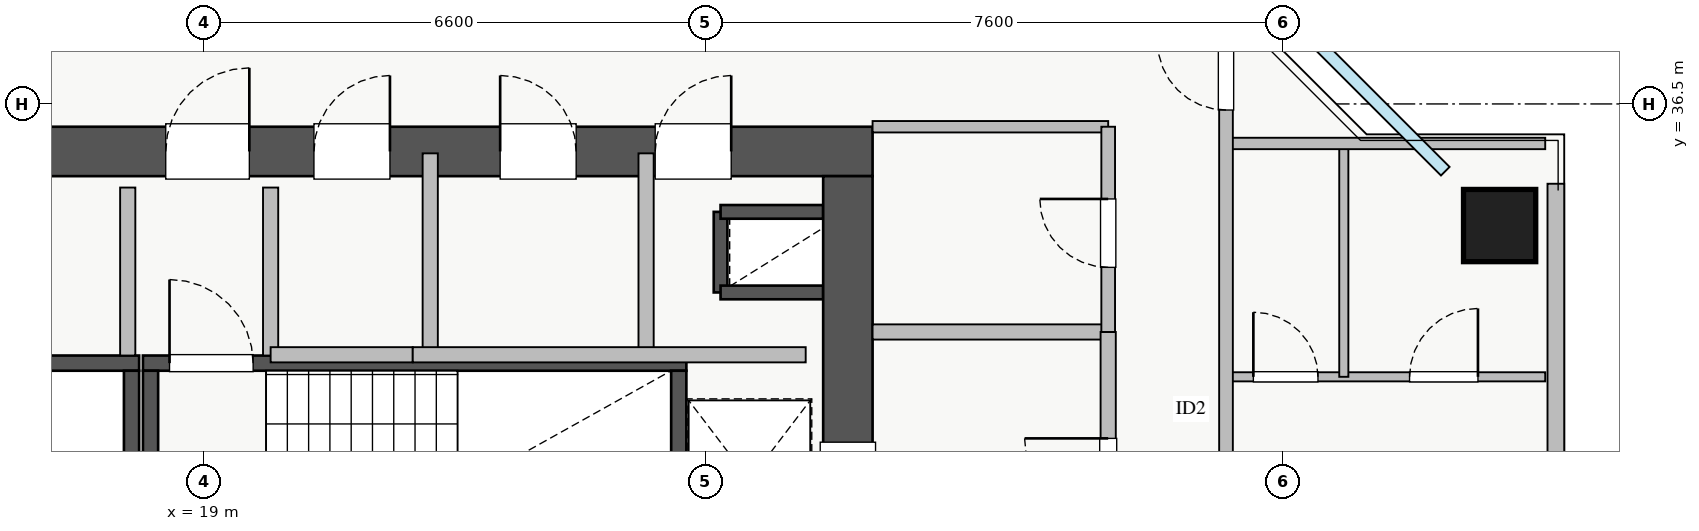
"""IFC4 building model, lengths in metres.
Left out: names, types, materials, properties, quantities, classifications, styles, units other than length and angle.
Written with IfcOpenShell. Run it as: python <this file> out.ifc"""

import sys

from ifc_helpers import new_model, si_unit, direction, frame, frame_2d, origin, origin_2d, place, context, subcontext, project, spatial, rectangle, extrude, source, transform, mapped, element, fill, save


model = new_model("IFC4")
c1 = context("Model", 3, precision=1e-05, world=origin(), true_north=direction((0.0, 1.0)))
c2 = subcontext(c1, "Body", "Model", "MODEL_VIEW")
j1 = project(units=[si_unit("LENGTHUNIT", "METRE"), si_unit("PLANEANGLEUNIT", "RADIAN")], contexts=[c1])
p1 = place(None, origin())
s1 = spatial("IfcSite", under=j1, at=p1, CompositionType="ELEMENT")
p2 = place(p1, origin())
s2 = spatial("IfcBuilding", under=s1, at=p2, CompositionType="ELEMENT")
p3 = place(p2, frame((0.0, 0.0, 160.0)))
s3 = spatial("IfcBuildingStorey", under=s2, at=p3, CompositionType="ELEMENT", Elevation=160.0)
p4 = place(p3, frame((25.8, 34.02, 0.0), z_axis=(0.0, 0.0, 1.0), x_axis=(0.0, 1.0, 0.0)))
e1 = element("IfcWall", 1, at=p4, inside=s3, PredefinedType="SHEAR", context=c2, shape_type="SweptSolid", body=[
    extrude(rectangle(XDim=1.06, YDim=0.18, at=frame_2d((0.53, 0.0))), origin(), (0.0, 0.0, 1.0), 3.07),
])
for number, where, z_axis, x_axis in (
    (2, (25.8, 35.08, 0.0), (0.0, 0.0, 1.0), (1.0, 0.0, 0.0)),
    (3, (25.8, 34.02, 0.0), (0.0, 0.0, 1.0), (1.0, 0.0, 0.0)),
):
    element("IfcWall", number, at=place(p3, frame(where, z_axis=z_axis, x_axis=x_axis)), inside=s3, PredefinedType="SHEAR", context=c2, shape_type="SweptSolid", body=[
        extrude(rectangle(XDim=1.35, YDim=0.18, at=frame_2d((0.675, 0.0))), origin(), (0.0, 0.0, 1.0), 3.07),
    ])
p5 = place(p3, frame((10.85, 33.09, 0.0), z_axis=(0.0, 0.0, 1.0), x_axis=(1.0, 0.0, 0.0)))
e4 = element("IfcWall", 4, at=p5, inside=s3, PredefinedType="SHEAR", context=c2, shape_type="SweptSolid", body=[
    extrude(rectangle(XDim=7.3, YDim=0.2, at=frame_2d((3.65, 0.0))), origin(), (0.0, 0.0, 1.0), 3.25),
])
p6 = place(p5, frame((0.35, 0.0, 0.0)))
e5 = element("IfcOpeningElement", 5, at=p6, cuts=e4, PredefinedType="OPENING", context=c2, shape_type="SweptSolid", body=[
    extrude(rectangle(XDim=1.1, YDim=2.05, at=frame_2d((0.55, 1.025))), frame((0.0, 0.11, 0.0), z_axis=(0.0, -1.0, 0.0), x_axis=(1.0, 0.0, 0.0)), (0.0, 0.0, 1.0), 0.22),
])
p7 = place(p3, frame((18.05, 30.05, 0.0), z_axis=(0.0, 0.0, 1.0), x_axis=(0.0, 1.0, 0.0)))
e6 = element("IfcWall", 6, at=p7, inside=s3, PredefinedType="SHEAR", context=c2, shape_type="SweptSolid", body=[
    extrude(rectangle(XDim=2.94, YDim=0.2, at=frame_2d((1.47, 0.0))), origin(), (0.0, 0.0, 1.0), 3.25),
])
p8 = place(p3, frame((18.2, 33.09, 0.0), z_axis=(0.0, 0.0, 1.0), x_axis=(1.0, 0.0, 0.0)))
e7 = element("IfcWall", 7, at=p8, inside=s3, PredefinedType="SHEAR", context=c2, shape_type="SweptSolid", body=[
    extrude(rectangle(XDim=7.15, YDim=0.2, at=frame_2d((3.575, 0.0))), origin(), (0.0, 0.0, 1.0), 3.25),
])
p9 = place(p8, frame((0.35, 0.0, 0.0)))
e8 = element("IfcOpeningElement", 8, at=p9, cuts=e7, PredefinedType="OPENING", context=c2, shape_type="SweptSolid", body=[
    extrude(rectangle(XDim=1.1, YDim=2.05, at=frame_2d((0.55, 1.025))), frame((0.0, 0.11, 0.0), z_axis=(0.0, -1.0, 0.0), x_axis=(1.0, 0.0, 0.0)), (0.0, 0.0, 1.0), 0.22),
])
for number, where, z_axis, x_axis in (
    (9, (18.3, 30.05, 0.0), (0.0, 0.0, 1.0), (0.0, 1.0, 0.0)),
    (10, (25.25, 30.05, 0.0), (0.0, 0.0, 1.0), (0.0, 1.0, 0.0)),
):
    element("IfcWall", number, at=place(p3, frame(where, z_axis=z_axis, x_axis=x_axis)), inside=s3, PredefinedType="SHEAR", context=c2, shape_type="SweptSolid", body=[
        extrude(rectangle(XDim=2.94, YDim=0.2, at=frame_2d((1.47, 0.0))), origin(), (0.0, 0.0, 1.0), 3.25),
    ])
p10 = place(p3, frame((10.2, 35.875, 0.0), z_axis=(0.0, 0.0, 1.0), x_axis=(1.0, 0.0, 0.0)))
e11 = element("IfcWall", 11, at=p10, inside=s3, PredefinedType="SHEAR", context=c2, shape_type="SweptSolid", body=[
    extrude(rectangle(XDim=17.6, YDim=0.65, at=frame_2d((8.8, 0.0))), origin(), (0.0, 0.0, 1.0), 3.25),
])
p11 = place(p10, frame((1.15, 0.0, 0.0)))
e12 = element("IfcOpeningElement", 12, at=p11, cuts=e11, PredefinedType="OPENING", context=c2, shape_type="SweptSolid", body=[
    extrude(rectangle(XDim=1.1, YDim=2.05, at=frame_2d((0.55, 1.025))), frame((0.0, 0.335, 0.0), z_axis=(0.0, -1.0, 0.0), x_axis=(1.0, 0.0, 0.0)), (0.0, 0.0, 1.0), 0.67),
])
p12 = place(p10, frame((8.3, 0.0, 0.0)))
e13 = element("IfcOpeningElement", 13, at=p12, cuts=e11, PredefinedType="OPENING", context=c2, shape_type="SweptSolid", body=[
    extrude(rectangle(XDim=1.1, YDim=2.05, at=frame_2d((0.55, 1.025))), frame((0.0, 0.335, 0.0), z_axis=(0.0, -1.0, 0.0), x_axis=(1.0, 0.0, 0.0)), (0.0, 0.0, 1.0), 0.67),
])
p13 = place(p10, frame((4.9, 0.0, 0.0)))
e14 = element("IfcOpeningElement", 14, at=p13, cuts=e11, PredefinedType="OPENING", context=c2, shape_type="SweptSolid", body=[
    extrude(rectangle(XDim=1.1, YDim=2.05, at=frame_2d((0.55, 1.025))), frame((0.0, 0.335, 0.0), z_axis=(0.0, -1.0, 0.0), x_axis=(1.0, 0.0, 0.0)), (0.0, 0.0, 1.0), 0.67),
])
p14 = place(p10, frame((14.74, 0.0, 0.0)))
e15 = element("IfcOpeningElement", 15, at=p14, cuts=e11, PredefinedType="OPENING", context=c2, shape_type="SweptSolid", body=[
    extrude(rectangle(XDim=1.0, YDim=2.05, at=frame_2d((0.5, 1.025))), frame((0.0, 0.335, 0.0), z_axis=(0.0, -1.0, 0.0), x_axis=(1.0, 0.0, 0.0)), (0.0, 0.0, 1.0), 0.67),
])
p15 = place(p10, frame((10.25, 0.0, 0.0)))
e16 = element("IfcOpeningElement", 16, at=p15, cuts=e11, PredefinedType="OPENING", context=c2, shape_type="SweptSolid", body=[
    extrude(rectangle(XDim=1.0, YDim=2.05, at=frame_2d((0.5, 1.025))), frame((0.0, 0.335, 0.0), z_axis=(0.0, -1.0, 0.0), x_axis=(1.0, 0.0, 0.0)), (0.0, 0.0, 1.0), 0.67),
])
p16 = place(p10, frame((12.7, 0.0, 0.0)))
e17 = element("IfcOpeningElement", 17, at=p16, cuts=e11, PredefinedType="OPENING", context=c2, shape_type="SweptSolid", body=[
    extrude(rectangle(XDim=1.0, YDim=2.05, at=frame_2d((0.5, 1.025))), frame((0.0, 0.335, 0.0), z_axis=(0.0, -1.0, 0.0), x_axis=(1.0, 0.0, 0.0)), (0.0, 0.0, 1.0), 0.67),
])
p17 = place(p3, frame((27.475, 29.65, 0.0), z_axis=(0.0, 0.0, 1.0), x_axis=(0.0, 1.0, 0.0)))
e18 = element("IfcWall", 18, at=p17, inside=s3, PredefinedType="SHEAR", context=c2, shape_type="SweptSolid", body=[
    extrude(rectangle(XDim=5.9, YDim=0.65, at=frame_2d((2.95, 0.0))), origin(), (0.0, 0.0, 1.0), 3.25),
])
p18 = place(p17, frame((1.1, 0.0, 0.0)))
e19 = element("IfcOpeningElement", 19, at=p18, cuts=e18, PredefinedType="OPENING", context=c2, shape_type="SweptSolid", body=[
    extrude(rectangle(XDim=1.3, YDim=2.05, at=frame_2d((0.65, 1.025))), frame((0.0, 0.335, 0.0), z_axis=(0.0, -1.0, 0.0), x_axis=(1.0, 0.0, 0.0)), (0.0, 0.0, 1.0), 0.67),
])
m1 = source(origin(), c2, "Body", "SweptSolid", [
    extrude(rectangle(XDim=0.95, YDim=0.95, at=origin_2d()), origin(), (0.0, 0.0, 1.0), 3.25),
])
p19 = place(p3, frame((36.05, 34.9, 0.0), z_axis=(0.0, 0.0, 1.0), x_axis=(1.0, 0.0, 0.0)))
e20 = element("IfcColumn", 20, at=p19, inside=s3, PredefinedType="COLUMN", context=c2, shape_type="MappedRepresentation", body=[
    mapped(m1, transform((0.0, 0.0, 0.0), x_axis=(1.0, 0.0, 0.0), y_axis=(0.0, 1.0, 0.0), z_axis=(0.0, 0.0, 1.0), scale=1.0)),
])
p20 = place(p3, frame((36.79, 29.15, 0.0), z_axis=(0.0, 0.0, 1.0), x_axis=(0.0, 1.0, 0.0)))
e21 = element("IfcWall", 21, at=p20, inside=s3, PredefinedType="STANDARD", context=c2, shape_type="SweptSolid", body=[
    extrude(rectangle(XDim=6.3, YDim=0.22, at=frame_2d((3.15, 0.0))), origin(), (0.0, 0.0, 1.0), 2.61),
])
p21 = place(p3, frame((27.8, 33.5, 0.0), z_axis=(0.0, 0.0, 1.0), x_axis=(1.0, 0.0, 0.0)))
e22 = element("IfcWall", 22, at=p21, inside=s3, PredefinedType="PARTITIONING", context=c2, shape_type="SweptSolid", body=[
    extrude(rectangle(XDim=3.1, YDim=0.2, at=frame_2d((1.55, 0.0))), origin(), (0.0, 0.0, 1.0), 3.07),
])
p22 = place(p3, frame((30.9, 29.6, 0.0), z_axis=(0.0, 0.0, 1.0), x_axis=(0.0, 1.0, 0.0)))
e23 = element("IfcWall", 23, at=p22, inside=s3, PredefinedType="PARTITIONING", context=c2, shape_type="SweptSolid", body=[
    extrude(rectangle(XDim=3.9, YDim=0.2, at=frame_2d((1.95, 0.0))), origin(), (0.0, 0.0, 1.0), 3.07),
])
p23 = place(p22, frame((1.4, 0.0, 0.0)))
e24 = element("IfcOpeningElement", 24, at=p23, cuts=e23, PredefinedType="OPENING", context=c2, shape_type="SweptSolid", body=[
    extrude(rectangle(XDim=1.1, YDim=2.05, at=frame_2d((0.55, 1.025))), frame((0.0, 0.11, 0.0), z_axis=(0.0, -1.0, 0.0), x_axis=(1.0, 0.0, 0.0)), (0.0, 0.0, 1.0), 0.22),
])
for number, where, z_axis, x_axis in (
    (25, (18.0, 33.19, 0.0), (0.0, 0.0, 1.0), (0.0, 1.0, 0.0)),
    (26, (19.88, 33.19, 0.0), (0.0, 0.0, 1.0), (0.0, 1.0, 0.0)),
):
    element("IfcWall", number, at=place(p3, frame(where, z_axis=z_axis, x_axis=x_axis)), inside=s3, PredefinedType="PARTITIONING", context=c2, shape_type="SweptSolid", body=[
        extrude(rectangle(XDim=2.21, YDim=0.2, at=frame_2d((1.105, 0.0))), origin(), (0.0, 0.0, 1.0), 3.07),
    ])
p24 = place(p3, frame((24.82, 33.2, 0.0), z_axis=(0.0, 0.0, 1.0), x_axis=(0.0, 1.0, 0.0)))
e27 = element("IfcWall", 27, at=p24, inside=s3, PredefinedType="PARTITIONING", context=c2, shape_type="SweptSolid", body=[
    extrude(rectangle(XDim=2.65, YDim=0.2, at=frame_2d((1.325, 0.0))), origin(), (0.0, 0.0, 1.0), 3.07),
])
p25 = place(p3, frame((19.88, 33.2, 0.0), z_axis=(0.0, 0.0, 1.0), x_axis=(1.0, 0.0, 0.0)))
e28 = element("IfcWall", 28, at=p25, inside=s3, PredefinedType="PARTITIONING", context=c2, shape_type="SweptSolid", body=[
    extrude(rectangle(XDim=1.87, YDim=0.2, at=frame_2d((0.935, 0.0))), origin(), (0.0, 0.0, 1.0), 3.07),
])
p26 = place(p3, frame((21.98, 33.2, 0.0), z_axis=(0.0, 0.0, 1.0), x_axis=(0.0, 1.0, 0.0)))
e29 = element("IfcWall", 29, at=p26, inside=s3, PredefinedType="PARTITIONING", context=c2, shape_type="SweptSolid", body=[
    extrude(rectangle(XDim=2.65, YDim=0.2, at=frame_2d((1.325, 0.0))), origin(), (0.0, 0.0, 1.0), 3.07),
])
p27 = place(p3, frame((21.75, 33.2, 0.0), z_axis=(0.0, 0.0, 1.0), x_axis=(1.0, 0.0, 0.0)))
e30 = element("IfcWall", 30, at=p27, inside=s3, PredefinedType="PARTITIONING", context=c2, shape_type="SweptSolid", body=[
    extrude(rectangle(XDim=5.17, YDim=0.2, at=frame_2d((2.585, 0.0))), origin(), (0.0, 0.0, 1.0), 3.07),
])
p28 = place(p3, frame((27.8, 36.2, 0.0), z_axis=(0.0, 0.0, 1.0), x_axis=(1.0, 0.0, 0.0)))
e31 = element("IfcWall", 31, at=p28, inside=s3, PredefinedType="PARTITIONING", context=c2, shape_type="SweptSolid", body=[
    extrude(rectangle(XDim=3.1, YDim=0.15, at=frame_2d((1.55, 0.0))), origin(), (0.0, 0.0, 1.0), 3.07),
])
p29 = place(p3, frame((30.9, 33.5, 0.0), z_axis=(0.0, 0.0, 1.0), x_axis=(0.0, 1.0, 0.0)))
e32 = element("IfcWall", 32, at=p29, inside=s3, PredefinedType="PARTITIONING", context=c2, shape_type="SweptSolid", body=[
    extrude(rectangle(XDim=2.7, YDim=0.18, at=frame_2d((1.35, 0.0))), origin(), (0.0, 0.0, 1.0), 2.565),
])
p30 = place(p29, frame((0.85, 0.0, 0.0)))
e33 = element("IfcOpeningElement", 33, at=p30, cuts=e32, PredefinedType="OPENING", context=c2, shape_type="SweptSolid", body=[
    extrude(rectangle(XDim=0.9, YDim=2.05, at=frame_2d((0.45, 1.025))), frame((0.0, 0.1, 0.0), z_axis=(0.0, -1.0, 0.0), x_axis=(1.0, 0.0, 0.0)), (0.0, 0.0, 1.0), 0.2),
])
p31 = place(p3, frame((32.45, 32.91, 0.0), z_axis=(0.0, 0.0, 1.0), x_axis=(1.0, 0.0, 0.0)))
e34 = element("IfcWall", 34, at=p31, inside=s3, PredefinedType="PLUMBINGWALL", context=c2, shape_type="SweptSolid", body=[
    extrude(rectangle(XDim=4.2, YDim=0.12, at=frame_2d((2.1, 0.0))), origin(), (0.0, 0.0, 1.0), 3.07),
])
p32 = place(p31, frame((0.36, 0.0, 0.0)))
e35 = element("IfcOpeningElement", 35, at=p32, cuts=e34, PredefinedType="OPENING", context=c2, shape_type="SweptSolid", body=[
    extrude(rectangle(XDim=0.85, YDim=2.05, at=frame_2d((0.425, 1.025))), frame((0.0, 0.07, 0.0), z_axis=(0.0, -1.0, 0.0), x_axis=(1.0, 0.0, 0.0)), (0.0, 0.0, 1.0), 0.14),
])
p33 = place(p31, frame((2.415, 0.0, 0.0)))
e36 = element("IfcOpeningElement", 36, at=p33, cuts=e34, PredefinedType="OPENING", context=c2, shape_type="SweptSolid", body=[
    extrude(rectangle(XDim=0.9, YDim=2.05, at=frame_2d((0.45, 1.025))), frame((0.0, 0.07, 0.0), z_axis=(0.0, -1.0, 0.0), x_axis=(1.0, 0.0, 0.0)), (0.0, 0.0, 1.0), 0.14),
])
p34 = place(p3, frame((34.0, 32.91, 0.0), z_axis=(0.0, 0.0, 1.0), x_axis=(0.0, 1.0, 0.0)))
e37 = element("IfcWall", 37, at=p34, inside=s3, PredefinedType="PLUMBINGWALL", context=c2, shape_type="SweptSolid", body=[
    extrude(rectangle(XDim=3.07, YDim=0.12, at=frame_2d((1.535, 0.0))), origin(), (0.0, 0.0, 1.0), 3.07),
])
p35 = place(p3, frame((32.45, 35.98, 0.0), z_axis=(0.0, 0.0, 1.0), x_axis=(1.0, 0.0, 0.0)))
e38 = element("IfcWall", 38, at=p35, inside=s3, PredefinedType="PARTITIONING", context=c2, shape_type="SweptSolid", body=[
    extrude(rectangle(XDim=4.2, YDim=0.15, at=frame_2d((2.1, 0.0))), origin(), (0.0, 0.0, 1.0), 3.07),
])
p36 = place(p3, frame((32.45, 29.3, 0.0), z_axis=(0.0, 0.0, 1.0), x_axis=(0.0, 1.0, 0.0)))
e39 = element("IfcWall", 39, at=p36, inside=s3, PredefinedType="PARTITIONING", context=c2, shape_type="SweptSolid", body=[
    extrude(rectangle(XDim=11.35, YDim=0.18, at=frame_2d((5.675, 0.0))), origin(), (0.0, 0.0, 1.0), 3.07),
])
p37 = place(p36, frame((1.115, 0.0, 0.0)))
e40 = element("IfcOpeningElement", 40, at=p37, cuts=e39, PredefinedType="OPENING", context=c2, shape_type="SweptSolid", body=[
    extrude(rectangle(XDim=1.0, YDim=2.05, at=frame_2d((0.5, 1.025))), frame((0.0, 0.1, 0.0), z_axis=(0.0, -1.0, 0.0), x_axis=(1.0, 0.0, 0.0)), (0.0, 0.0, 1.0), 0.2),
])
p38 = place(p36, frame((7.12, 0.0, 0.0)))
e41 = element("IfcOpeningElement", 41, at=p38, cuts=e39, PredefinedType="OPENING", context=c2, shape_type="SweptSolid", body=[
    extrude(rectangle(XDim=0.9, YDim=2.05, at=frame_2d((0.45, 1.025))), frame((0.0, 0.1, 0.0), z_axis=(0.0, -1.0, 0.0), x_axis=(1.0, 0.0, 0.0)), (0.0, 0.0, 1.0), 0.2),
])
m2 = source(origin(), c2, "Body", "SweptSolid", [
    extrude(rectangle(XDim=1.3, YDim=2.05, at=frame_2d((0.65, 1.025))), frame((0.0, 0.025, 0.0), z_axis=(0.0, -1.0, 0.0), x_axis=(1.0, 0.0, 0.0)), (0.0, 0.0, 1.0), 0.05),
])
p39 = place(p18, origin())
e42 = element("IfcDoor", 42, at=p39, inside=s3, OperationType="SLIDING_TO_LEFT", PredefinedType="DOOR", context=c2, shape_type="MappedRepresentation", body=[
    mapped(m2, transform((0.0, 0.0, 0.0), x_axis=(1.0, 0.0, 0.0), y_axis=(0.0, 1.0, 0.0), z_axis=(0.0, 0.0, 1.0), scale=1.0)),
])
fill(e19, e42)
m3 = source(origin(), c2, "Body", "SweptSolid", [
    extrude(rectangle(XDim=1.1, YDim=2.05, at=frame_2d((0.55, 1.025))), frame((0.0, 0.025, 0.0), z_axis=(0.0, -1.0, 0.0), x_axis=(1.0, 0.0, 0.0)), (0.0, 0.0, 1.0), 0.05),
])
p40 = place(p12, origin())
e43 = element("IfcDoor", 43, at=p40, inside=s3, OperationType="SINGLE_SWING_RIGHT", PredefinedType="DOOR", context=c2, shape_type="MappedRepresentation", body=[
    mapped(m3, transform((0.0, 0.0, 0.0), x_axis=(1.0, 0.0, 0.0), y_axis=(0.0, 1.0, 0.0), z_axis=(0.0, 0.0, 1.0), scale=1.0)),
])
fill(e13, e43)
p41 = place(p9, origin())
e44 = element("IfcDoor", 44, at=p41, inside=s3, OperationType="SINGLE_SWING_LEFT", PredefinedType="DOOR", context=c2, shape_type="MappedRepresentation", body=[
    mapped(m3, transform((0.0, 0.0, 0.0), x_axis=(1.0, 0.0, 0.0), y_axis=(0.0, 1.0, 0.0), z_axis=(0.0, 0.0, 1.0), scale=1.0)),
])
fill(e8, e44)
m4 = source(origin(), c2, "Body", "SweptSolid", [
    extrude(rectangle(XDim=1.0, YDim=2.05, at=frame_2d((0.5, 1.025))), frame((0.0, 0.025, 0.0), z_axis=(0.0, -1.0, 0.0), x_axis=(1.0, 0.0, 0.0)), (0.0, 0.0, 1.0), 0.05),
])
p42 = place(p14, origin())
e45 = element("IfcDoor", 45, at=p42, inside=s3, OperationType="SINGLE_SWING_RIGHT", PredefinedType="DOOR", context=c2, shape_type="MappedRepresentation", body=[
    mapped(m4, transform((0.0, 0.0, 0.0), x_axis=(1.0, 0.0, 0.0), y_axis=(0.0, 1.0, 0.0), z_axis=(0.0, 0.0, 1.0), scale=1.0)),
])
fill(e15, e45)
p43 = place(p15, origin())
e46 = element("IfcDoor", 46, at=p43, inside=s3, OperationType="SINGLE_SWING_RIGHT", PredefinedType="DOOR", context=c2, shape_type="MappedRepresentation", body=[
    mapped(m4, transform((0.0, 0.0, 0.0), x_axis=(1.0, 0.0, 0.0), y_axis=(0.0, 1.0, 0.0), z_axis=(0.0, 0.0, 1.0), scale=1.0)),
])
fill(e16, e46)
p44 = place(p16, origin())
e47 = element("IfcDoor", 47, at=p44, inside=s3, OperationType="SINGLE_SWING_LEFT", PredefinedType="DOOR", context=c2, shape_type="MappedRepresentation", body=[
    mapped(m4, transform((0.0, 0.0, 0.0), x_axis=(1.0, 0.0, 0.0), y_axis=(0.0, 1.0, 0.0), z_axis=(0.0, 0.0, 1.0), scale=1.0)),
])
fill(e17, e47)
p45 = place(p23, origin())
e48 = element("IfcDoor", 48, at=p45, inside=s3, OperationType="SINGLE_SWING_RIGHT", PredefinedType="DOOR", context=c2, shape_type="MappedRepresentation", body=[
    mapped(m3, transform((0.0, 0.0, 0.0), x_axis=(1.0, 0.0, 0.0), y_axis=(0.0, 1.0, 0.0), z_axis=(0.0, 0.0, 1.0), scale=1.0)),
])
fill(e24, e48)
m5 = source(origin(), c2, "Body", "SweptSolid", [
    extrude(rectangle(XDim=0.9, YDim=2.05, at=frame_2d((0.45, 1.025))), frame((0.0, 0.025, 0.0), z_axis=(0.0, -1.0, 0.0), x_axis=(1.0, 0.0, 0.0)), (0.0, 0.0, 1.0), 0.05),
])
p46 = place(p30, origin())
e49 = element("IfcDoor", 49, at=p46, inside=s3, OperationType="SINGLE_SWING_RIGHT", PredefinedType="DOOR", context=c2, shape_type="MappedRepresentation", body=[
    mapped(m5, transform((0.0, 0.0, 0.0), x_axis=(1.0, 0.0, 0.0), y_axis=(0.0, 1.0, 0.0), z_axis=(0.0, 0.0, 1.0), scale=1.0)),
])
fill(e33, e49)
m6 = source(origin(), c2, "Body", "SweptSolid", [
    extrude(rectangle(XDim=0.85, YDim=2.05, at=frame_2d((0.425, 1.025))), frame((0.0, 0.025, 0.0), z_axis=(0.0, -1.0, 0.0), x_axis=(1.0, 0.0, 0.0)), (0.0, 0.0, 1.0), 0.05),
])
p47 = place(p32, origin())
e50 = element("IfcDoor", 50, at=p47, inside=s3, OperationType="SINGLE_SWING_LEFT", PredefinedType="DOOR", context=c2, shape_type="MappedRepresentation", body=[
    mapped(m6, transform((0.0, 0.0, 0.0), x_axis=(1.0, 0.0, 0.0), y_axis=(0.0, 1.0, 0.0), z_axis=(0.0, 0.0, 1.0), scale=1.0)),
])
fill(e35, e50)
p48 = place(p33, origin())
e51 = element("IfcDoor", 51, at=p48, inside=s3, OperationType="SINGLE_SWING_RIGHT", PredefinedType="DOOR", context=c2, shape_type="MappedRepresentation", body=[
    mapped(m5, transform((0.0, 0.0, 0.0), x_axis=(1.0, 0.0, 0.0), y_axis=(0.0, 1.0, 0.0), z_axis=(0.0, 0.0, 1.0), scale=1.0)),
])
fill(e36, e51)
p49 = place(p38, origin())
e52 = element("IfcDoor", 52, at=p49, inside=s3, OperationType="SINGLE_SWING_RIGHT", PredefinedType="DOOR", context=c2, shape_type="MappedRepresentation", body=[
    mapped(m5, transform((0.0, 0.0, 0.0), x_axis=(1.0, 0.0, 0.0), y_axis=(0.0, 1.0, 0.0), z_axis=(0.0, 0.0, 1.0), scale=1.0)),
])
fill(e41, e52)
save(model, sys.argv[1])
